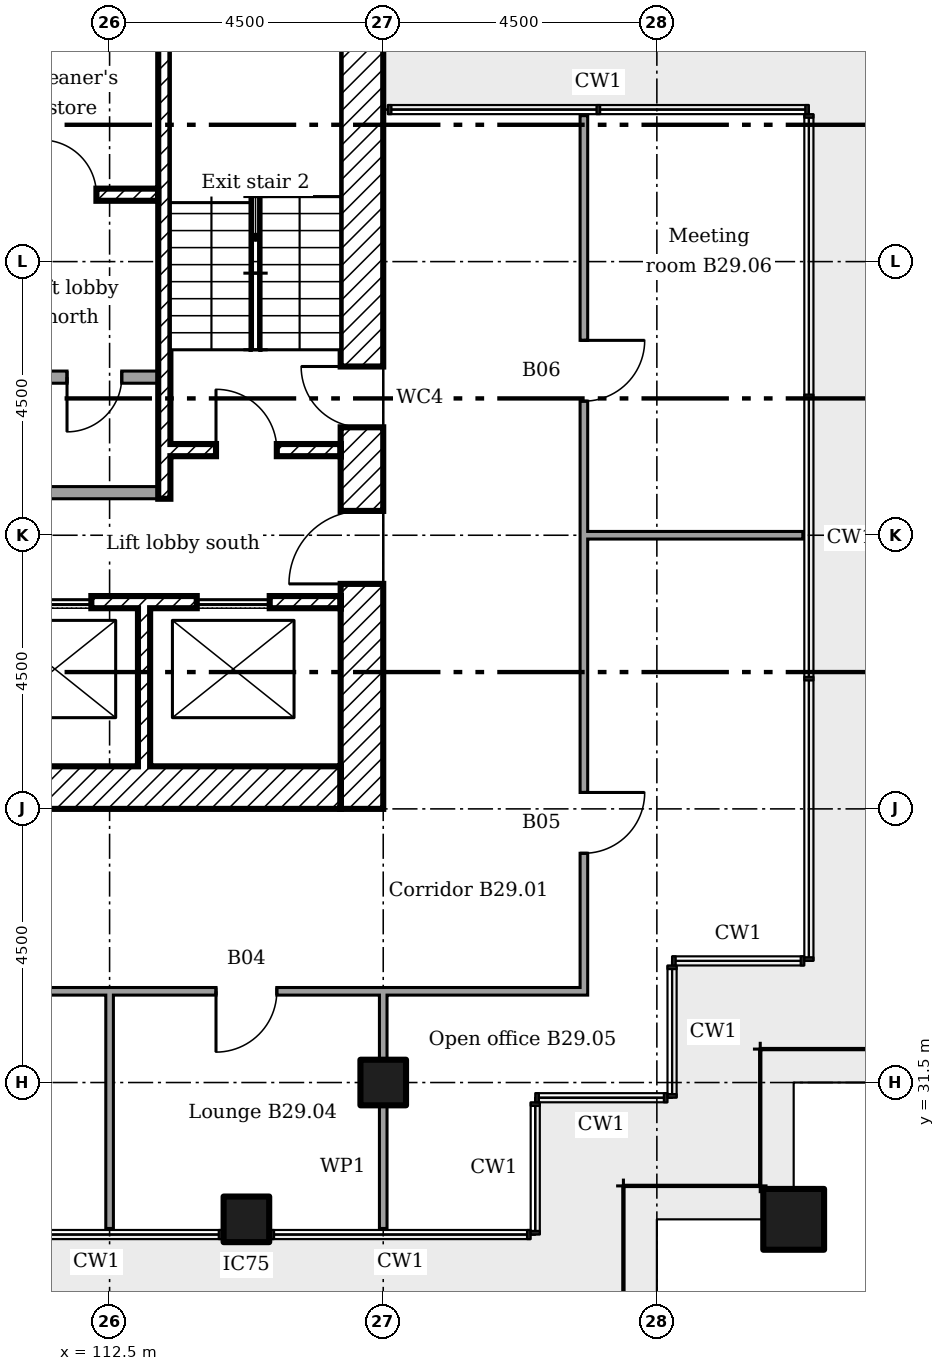
"""IFC4 building model, lengths in metres.
Left out: names, types, materials, properties, quantities, classifications, styles, units other than length and angle.
Written with IfcOpenShell. Run it as: python <this file> out.ifc"""

import sys

from ifc_helpers import new_model, si_unit, direction, frame, frame_2d, origin, origin_2d, place, context, subcontext, project, spatial, rectangle, extrude, element, fill, save


model = new_model("IFC4")
c1 = context("Model", 3, precision=1e-05, world=origin(), true_north=direction((0.0, 1.0)))
c2 = subcontext(c1, "Body", "Model", "MODEL_VIEW")
j1 = project(units=[si_unit("LENGTHUNIT", "METRE"), si_unit("PLANEANGLEUNIT", "RADIAN")], contexts=[c1])
p1 = place(None, origin())
s1 = spatial("IfcSite", under=j1, at=p1, CompositionType="ELEMENT")
p2 = place(p1, origin())
s2 = spatial("IfcBuilding", under=s1, at=p2, CompositionType="ELEMENT")
p3 = place(p2, frame((0.0, 0.0, 120.8)))
s3 = spatial("IfcBuildingStorey", under=s2, at=p3, CompositionType="ELEMENT", Elevation=120.8)
p4 = place(p3, frame((123.75, 29.25, 0.0)))
e1 = element("IfcColumn", 1, at=p4, inside=s3, PredefinedType="COLUMN", context=c2, shape_type="SweptSolid", body=[
    extrude(rectangle(XDim=1.0, YDim=1.0, at=origin_2d()), origin(), (0.0, 0.0, 1.0), 3.6),
])
for number, where in (
    (2, (114.75, 29.25, 0.0)),
    (3, (117.0, 31.5, 0.0)),
):
    element("IfcColumn", number, at=place(p3, frame(where)), inside=s3, PredefinedType="COLUMN", context=c2, shape_type="SweptSolid", body=[
        extrude(rectangle(XDim=0.75, YDim=0.75, at=origin_2d()), origin(), (0.0, 0.0, 1.0), 3.6),
    ])
p5 = place(p3, frame((116.65, 36.0, 0.0), z_axis=(0.0, 0.0, 1.0), x_axis=(0.0, 1.0, 0.0)))
e4 = element("IfcWall", 4, at=p5, inside=s3, PredefinedType="SHEAR", context=c2, shape_type="SweptSolid", body=[
    extrude(rectangle(XDim=13.5, YDim=0.7, at=frame_2d((6.75, 0.0))), origin(), (0.0, 0.0, 1.0), 3.35),
])
p6 = place(p5, frame((3.7, 0.0, 0.0)))
e5 = element("IfcOpeningElement", 5, at=p6, cuts=e4, PredefinedType="OPENING", context=c2, shape_type="SweptSolid", body=[
    extrude(rectangle(XDim=1.2, YDim=2.1, at=frame_2d((0.6, 1.05))), frame((0.0, 0.36, 0.0), z_axis=(0.0, -1.0, 0.0), x_axis=(1.0, 0.0, 0.0)), (0.0, 0.0, 1.0), 0.72),
])
p7 = place(p5, frame((6.275, 0.0, 0.0)))
e6 = element("IfcOpeningElement", 6, at=p7, cuts=e4, PredefinedType="OPENING", context=c2, shape_type="SweptSolid", body=[
    extrude(rectangle(XDim=1.0, YDim=2.1, at=frame_2d((0.5, 1.05))), frame((0.0, 0.36, 0.0), z_axis=(0.0, -1.0, 0.0), x_axis=(1.0, 0.0, 0.0)), (0.0, 0.0, 1.0), 0.72),
])
p8 = place(p3, frame((104.2, 36.35, 0.0)))
e7 = element("IfcWall", 7, at=p8, inside=s3, PredefinedType="SHEAR", context=c2, shape_type="SweptSolid", body=[
    extrude(rectangle(XDim=12.1, YDim=0.7, at=frame_2d((6.05, 0.0))), origin(), (0.0, 0.0, 1.0), 3.35),
])
p9 = place(p3, frame((113.067, 36.7, 0.0), z_axis=(0.0, 0.0, 1.0), x_axis=(0.0, 1.0, 0.0)))
e8 = element("IfcWall", 8, at=p9, inside=s3, PredefinedType="SHEAR", context=c2, shape_type="SweptSolid", body=[
    extrude(rectangle(XDim=2.6, YDim=0.2, at=frame_2d((1.3, 0.0))), origin(), (0.0, 0.0, 1.0), 3.35),
])
p10 = place(p3, frame((110.467, 46.1, 0.0)))
e9 = element("IfcWall", 9, at=p10, inside=s3, PredefinedType="SHEAR", context=c2, shape_type="SweptSolid", body=[
    extrude(rectangle(XDim=2.833, YDim=0.2, at=frame_2d((1.417, 0.0))), origin(), (0.0, 0.0, 1.0), 3.35),
])
p11 = place(p10, frame((0.917, 0.0, 0.0)))
e10 = element("IfcOpeningElement", 10, at=p11, cuts=e9, PredefinedType="OPENING", context=c2, shape_type="SweptSolid", body=[
    extrude(rectangle(XDim=0.9, YDim=2.1, at=frame_2d((0.45, 1.05))), frame((0.0, 0.11, 0.0), z_axis=(0.0, -1.0, 0.0), x_axis=(1.0, 0.0, 0.0)), (0.0, 0.0, 1.0), 0.22),
])
p12 = place(p3, frame((107.2, 39.4, 0.0)))
e11 = element("IfcWall", 11, at=p12, inside=s3, PredefinedType="SHEAR", context=c2, shape_type="SweptSolid", body=[
    extrude(rectangle(XDim=9.1, YDim=0.2, at=frame_2d((4.55, 0.0))), origin(), (0.0, 0.0, 1.0), 3.35),
])
p13 = place(p12, frame((0.867, 0.0, 0.0)))
e12 = element("IfcOpeningElement", 12, at=p13, cuts=e11, PredefinedType="OPENING", context=c2, shape_type="SweptSolid", body=[
    extrude(rectangle(XDim=1.2, YDim=2.1, at=frame_2d((0.6, 1.05))), frame((0.0, 0.11, 0.0), z_axis=(0.0, -1.0, 0.0), x_axis=(1.0, 0.0, 0.0)), (0.0, 0.0, 1.0), 0.22),
])
p14 = place(p12, frame((3.8, 0.0, 0.0)))
e13 = element("IfcOpeningElement", 13, at=p14, cuts=e11, PredefinedType="OPENING", context=c2, shape_type="SweptSolid", body=[
    extrude(rectangle(XDim=1.2, YDim=2.1, at=frame_2d((0.6, 1.05))), frame((0.0, 0.11, 0.0), z_axis=(0.0, -1.0, 0.0), x_axis=(1.0, 0.0, 0.0)), (0.0, 0.0, 1.0), 0.22),
])
p15 = place(p12, frame((6.733, 0.0, 0.0)))
e14 = element("IfcOpeningElement", 14, at=p15, cuts=e11, PredefinedType="OPENING", context=c2, shape_type="SweptSolid", body=[
    extrude(rectangle(XDim=1.2, YDim=2.1, at=frame_2d((0.6, 1.05))), frame((0.0, 0.11, 0.0), z_axis=(0.0, -1.0, 0.0), x_axis=(1.0, 0.0, 0.0)), (0.0, 0.0, 1.0), 0.22),
])
p16 = place(p3, frame((113.5, 41.9, 0.0)))
e15 = element("IfcWall", 15, at=p16, inside=s3, PredefinedType="SHEAR", context=c2, shape_type="SweptSolid", body=[
    extrude(rectangle(XDim=2.8, YDim=0.2, at=frame_2d((1.4, 0.0))), origin(), (0.0, 0.0, 1.0), 3.35),
])
p17 = place(p16, frame((0.75, 0.0, 0.0)))
e16 = element("IfcOpeningElement", 16, at=p17, cuts=e15, PredefinedType="OPENING", context=c2, shape_type="SweptSolid", body=[
    extrude(rectangle(XDim=1.0, YDim=2.1, at=frame_2d((0.5, 1.05))), frame((0.0, 0.11, 0.0), z_axis=(0.0, -1.0, 0.0), x_axis=(1.0, 0.0, 0.0)), (0.0, 0.0, 1.0), 0.22),
])
p18 = place(p3, frame((113.4, 41.1, 0.0), z_axis=(0.0, 0.0, 1.0), x_axis=(0.0, 1.0, 0.0)))
e17 = element("IfcWall", 17, at=p18, inside=s3, PredefinedType="SHEAR", context=c2, shape_type="SweptSolid", body=[
    extrude(rectangle(XDim=7.7, YDim=0.2, at=frame_2d((3.85, 0.0))), origin(), (0.0, 0.0, 1.0), 3.35),
])
p19 = place(p3, frame((107.2, 43.1, 0.0)))
e18 = element("IfcWall", 18, at=p19, inside=s3, PredefinedType="PARTITIONING", context=c2, shape_type="SweptSolid", body=[
    extrude(rectangle(XDim=6.1, YDim=0.2, at=frame_2d((3.05, 0.0))), origin(), (0.0, 0.0, 1.0), 3.35),
])
p20 = place(p19, frame((4.6, 0.0, 0.0)))
e19 = element("IfcOpeningElement", 19, at=p20, cuts=e18, PredefinedType="OPENING", context=c2, shape_type="SweptSolid", body=[
    extrude(rectangle(XDim=0.9, YDim=2.1, at=frame_2d((0.45, 1.05))), frame((0.0, 0.11, 0.0), z_axis=(0.0, -1.0, 0.0), x_axis=(1.0, 0.0, 0.0)), (0.0, 0.0, 1.0), 0.22),
])
p21 = place(p3, frame((107.2, 41.2, 0.0)))
e20 = element("IfcWall", 20, at=p21, inside=s3, PredefinedType="PARTITIONING", context=c2, shape_type="SweptSolid", body=[
    extrude(rectangle(XDim=6.1, YDim=0.2, at=frame_2d((3.05, 0.0))), origin(), (0.0, 0.0, 1.0), 3.35),
])
p22 = place(p21, frame((0.55, 0.0, 0.0)))
e21 = element("IfcOpeningElement", 21, at=p22, cuts=e20, PredefinedType="OPENING", context=c2, shape_type="SweptSolid", body=[
    extrude(rectangle(XDim=0.9, YDim=2.1, at=frame_2d((0.45, 1.05))), frame((0.0, 0.11, 0.0), z_axis=(0.0, -1.0, 0.0), x_axis=(1.0, 0.0, 0.0)), (0.0, 0.0, 1.0), 0.22),
])
p23 = place(p21, frame((2.55, 0.0, 0.0)))
e22 = element("IfcOpeningElement", 22, at=p23, cuts=e20, PredefinedType="OPENING", context=c2, shape_type="SweptSolid", body=[
    extrude(rectangle(XDim=0.9, YDim=2.1, at=frame_2d((0.45, 1.05))), frame((0.0, 0.11, 0.0), z_axis=(0.0, -1.0, 0.0), x_axis=(1.0, 0.0, 0.0)), (0.0, 0.0, 1.0), 0.22),
])
p24 = place(p3, frame((100.137, 33.0, 0.0)))
e23 = element("IfcWall", 23, at=p24, inside=s3, PredefinedType="PARTITIONING", context=c2, shape_type="SweptSolid", body=[
    extrude(rectangle(XDim=20.225, YDim=0.125, at=frame_2d((10.113, 0.0))), origin(), (0.0, 0.0, 1.0), 3.45),
])
p25 = place(p24, frame((8.605, 0.0, 0.0)))
e24 = element("IfcOpeningElement", 24, at=p25, cuts=e23, PredefinedType="OPENING", context=c2, shape_type="SweptSolid", body=[
    extrude(rectangle(XDim=1.0, YDim=2.1, at=frame_2d((0.5, 1.05))), frame((0.0, 0.073, 0.0), z_axis=(0.0, -1.0, 0.0), x_axis=(1.0, 0.0, 0.0)), (0.0, 0.0, 1.0), 0.145),
])
p26 = place(p24, frame((14.113, 0.0, 0.0)))
e25 = element("IfcOpeningElement", 25, at=p26, cuts=e23, PredefinedType="OPENING", context=c2, shape_type="SweptSolid", body=[
    extrude(rectangle(XDim=1.0, YDim=2.1, at=frame_2d((0.5, 1.05))), frame((0.0, 0.073, 0.0), z_axis=(0.0, -1.0, 0.0), x_axis=(1.0, 0.0, 0.0)), (0.0, 0.0, 1.0), 0.145),
])
p27 = place(p3, frame((120.3, 40.5, 0.0)))
e26 = element("IfcWall", 26, at=p27, inside=s3, PredefinedType="PARTITIONING", context=c2, shape_type="SweptSolid", body=[
    extrude(rectangle(XDim=3.6, YDim=0.125, at=frame_2d((1.8, 0.0))), origin(), (0.0, 0.0, 1.0), 2.851),
])
p28 = place(p3, frame((112.5, 29.1, 0.0), z_axis=(0.0, 0.0, 1.0), x_axis=(0.0, 1.0, 0.0)))
e27 = element("IfcWall", 27, at=p28, inside=s3, PredefinedType="PARTITIONING", context=c2, shape_type="SweptSolid", body=[
    extrude(rectangle(XDim=3.9, YDim=0.125, at=frame_2d((1.95, 0.0))), origin(), (0.0, 0.0, 1.0), 2.851),
])
p29 = place(p3, frame((117.0, 29.1, 0.0), z_axis=(0.0, 0.0, 1.0), x_axis=(0.0, 1.0, 0.0)))
e28 = element("IfcWall", 28, at=p29, inside=s3, PredefinedType="PARTITIONING", context=c2, shape_type="SweptSolid", body=[
    extrude(rectangle(XDim=2.025, YDim=0.125, at=frame_2d((1.012, 0.0))), origin(), (0.0, 0.0, 1.0), 2.842),
])
p30 = place(p3, frame((117.0, 31.875, 0.0), z_axis=(0.0, 0.0, 1.0), x_axis=(0.0, 1.0, 0.0)))
e29 = element("IfcWall", 29, at=p30, inside=s3, PredefinedType="PARTITIONING", context=c2, shape_type="SweptSolid", body=[
    extrude(rectangle(XDim=1.125, YDim=0.125, at=frame_2d((0.562, 0.0))), origin(), (0.0, 0.0, 1.0), 2.842),
])
p31 = place(p3, frame((120.3, 33.062, 0.0), z_axis=(0.0, 0.0, 1.0), x_axis=(0.0, 1.0, 0.0)))
e30 = element("IfcWall", 30, at=p31, inside=s3, PredefinedType="PARTITIONING", context=c2, shape_type="SweptSolid", body=[
    extrude(rectangle(XDim=14.337, YDim=0.125, at=frame_2d((7.169, 0.0))), origin(), (0.0, 0.0, 1.0), 3.45),
])
p32 = place(p31, frame((2.208, 0.0, 0.0)))
e31 = element("IfcOpeningElement", 31, at=p32, cuts=e30, PredefinedType="OPENING", context=c2, shape_type="SweptSolid", body=[
    extrude(rectangle(XDim=1.0, YDim=2.1, at=frame_2d((0.5, 1.05))), frame((0.0, 0.073, 0.0), z_axis=(0.0, -1.0, 0.0), x_axis=(1.0, 0.0, 0.0)), (0.0, 0.0, 1.0), 0.145),
])
p33 = place(p31, frame((9.643, 0.0, 0.0)))
e32 = element("IfcOpeningElement", 32, at=p33, cuts=e30, PredefinedType="OPENING", context=c2, shape_type="SweptSolid", body=[
    extrude(rectangle(XDim=1.0, YDim=2.1, at=frame_2d((0.5, 1.05))), frame((0.0, 0.073, 0.0), z_axis=(0.0, -1.0, 0.0), x_axis=(1.0, 0.0, 0.0)), (0.0, 0.0, 1.0), 0.145),
])
p34 = place(p6, origin())
e33 = element("IfcDoor", 33, at=p34, inside=s3, OperationType="SINGLE_SWING_RIGHT", PredefinedType="DOOR", context=c2, shape_type="SweptSolid", body=[
    extrude(rectangle(XDim=1.2, YDim=2.1, at=frame_2d((0.6, 1.05))), frame((0.0, 0.025, 0.0), z_axis=(0.0, -1.0, 0.0), x_axis=(1.0, 0.0, 0.0)), (0.0, 0.0, 1.0), 0.05),
])
fill(e5, e33)
p35 = place(p17, origin())
e34 = element("IfcDoor", 34, at=p35, inside=s3, OperationType="SINGLE_SWING_RIGHT", PredefinedType="DOOR", context=c2, shape_type="SweptSolid", body=[
    extrude(rectangle(XDim=1.0, YDim=2.1, at=frame_2d((0.5, 1.05))), frame((0.0, 0.025, 0.0), z_axis=(0.0, -1.0, 0.0), x_axis=(1.0, 0.0, 0.0)), (0.0, 0.0, 1.0), 0.05),
])
fill(e16, e34)
p36 = place(p7, origin())
e35 = element("IfcDoor", 35, at=p36, inside=s3, OperationType="SINGLE_SWING_LEFT", PredefinedType="DOOR", context=c2, shape_type="SweptSolid", body=[
    extrude(rectangle(XDim=1.0, YDim=2.1, at=frame_2d((0.5, 1.05))), frame((0.0, 0.025, 0.0), z_axis=(0.0, -1.0, 0.0), x_axis=(1.0, 0.0, 0.0)), (0.0, 0.0, 1.0), 0.05),
])
fill(e6, e35)
p37 = place(p11, origin())
e36 = element("IfcDoor", 36, at=p37, inside=s3, OperationType="SINGLE_SWING_RIGHT", PredefinedType="DOOR", context=c2, shape_type="SweptSolid", body=[
    extrude(rectangle(XDim=0.9, YDim=2.1, at=frame_2d((0.45, 1.05))), frame((0.0, 0.025, 0.0), z_axis=(0.0, -1.0, 0.0), x_axis=(1.0, 0.0, 0.0)), (0.0, 0.0, 1.0), 0.05),
])
fill(e10, e36)
p38 = place(p20, frame((0.9, 0.0, 0.0), x_axis=(-1.0, 0.0, 0.0)))
e37 = element("IfcDoor", 37, at=p38, inside=s3, OperationType="SINGLE_SWING_LEFT", PredefinedType="DOOR", context=c2, shape_type="SweptSolid", body=[
    extrude(rectangle(XDim=0.9, YDim=2.1, at=frame_2d((0.45, 1.05))), frame((0.0, 0.025, 0.0), z_axis=(0.0, -1.0, 0.0), x_axis=(1.0, 0.0, 0.0)), (0.0, 0.0, 1.0), 0.05),
])
fill(e19, e37)
p39 = place(p14, origin())
e38 = element("IfcDoor", 38, at=p39, inside=s3, OperationType="SLIDING_TO_LEFT", PredefinedType="DOOR", context=c2, shape_type="SweptSolid", body=[
    extrude(rectangle(XDim=1.2, YDim=2.1, at=frame_2d((0.6, 1.05))), frame((0.0, 0.025, 0.0), z_axis=(0.0, -1.0, 0.0), x_axis=(1.0, 0.0, 0.0)), (0.0, 0.0, 1.0), 0.05),
])
fill(e13, e38)
p40 = place(p15, origin())
e39 = element("IfcDoor", 39, at=p40, inside=s3, OperationType="SLIDING_TO_LEFT", PredefinedType="DOOR", context=c2, shape_type="SweptSolid", body=[
    extrude(rectangle(XDim=1.2, YDim=2.1, at=frame_2d((0.6, 1.05))), frame((0.0, 0.025, 0.0), z_axis=(0.0, -1.0, 0.0), x_axis=(1.0, 0.0, 0.0)), (0.0, 0.0, 1.0), 0.05),
])
fill(e14, e39)
p41 = place(p26, frame((1.0, 0.0, 0.0), x_axis=(-1.0, 0.0, 0.0)))
e40 = element("IfcDoor", 40, at=p41, inside=s3, OperationType="SINGLE_SWING_LEFT", PredefinedType="DOOR", context=c2, shape_type="SweptSolid", body=[
    extrude(rectangle(XDim=1.0, YDim=2.1, at=frame_2d((0.5, 1.05))), frame((0.0, 0.025, 0.0), z_axis=(0.0, -1.0, 0.0), x_axis=(1.0, 0.0, 0.0)), (0.0, 0.0, 1.0), 0.05),
])
fill(e25, e40)
p42 = place(p32, frame((1.0, 0.0, 0.0), x_axis=(-1.0, 0.0, 0.0)))
e41 = element("IfcDoor", 41, at=p42, inside=s3, OperationType="SINGLE_SWING_RIGHT", PredefinedType="DOOR", context=c2, shape_type="SweptSolid", body=[
    extrude(rectangle(XDim=1.0, YDim=2.1, at=frame_2d((0.5, 1.05))), frame((0.0, 0.025, 0.0), z_axis=(0.0, -1.0, 0.0), x_axis=(1.0, 0.0, 0.0)), (0.0, 0.0, 1.0), 0.05),
])
fill(e31, e41)
p43 = place(p33, frame((1.0, 0.0, 0.0), x_axis=(-1.0, 0.0, 0.0)))
e42 = element("IfcDoor", 42, at=p43, inside=s3, OperationType="SINGLE_SWING_RIGHT", PredefinedType="DOOR", context=c2, shape_type="SweptSolid", body=[
    extrude(rectangle(XDim=1.0, YDim=2.1, at=frame_2d((0.5, 1.05))), frame((0.0, 0.025, 0.0), z_axis=(0.0, -1.0, 0.0), x_axis=(1.0, 0.0, 0.0)), (0.0, 0.0, 1.0), 0.05),
])
fill(e32, e42)
save(model, sys.argv[1])
